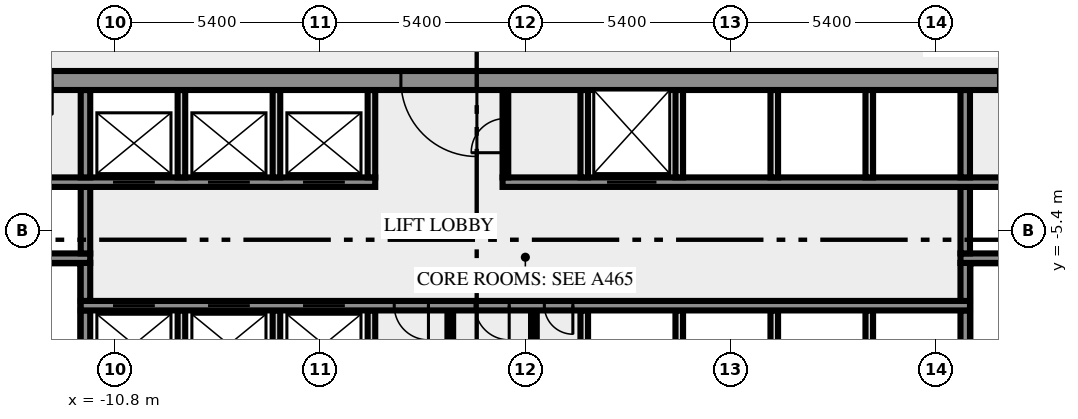
"""IFC4 building model, lengths in metres.
Left out: names, types, materials, properties, quantities, classifications, styles, units other than length and angle.
Written with IfcOpenShell. Run it as: python <this file> out.ifc"""

import sys

from ifc_helpers import new_model, si_unit, direction, frame, frame_2d, origin, place, context, subcontext, project, spatial, rectangle, extrude, element, fill, save


model = new_model("IFC4")
c1 = context("Model", 3, precision=1e-05, world=origin(), true_north=direction((0.0, 1.0)))
c2 = subcontext(c1, "Body", "Model", "MODEL_VIEW")
j1 = project(units=[si_unit("LENGTHUNIT", "METRE"), si_unit("PLANEANGLEUNIT", "RADIAN")], contexts=[c1])
p1 = place(None, origin())
s1 = spatial("IfcSite", under=j1, at=p1, CompositionType="ELEMENT")
p2 = place(p1, origin())
s2 = spatial("IfcBuilding", under=s1, at=p2, CompositionType="ELEMENT")
p3 = place(p2, frame((0.0, 0.0, 89.0)))
s3 = spatial("IfcBuildingStorey", under=s2, at=p3, CompositionType="ELEMENT", Elevation=89.0)
p4 = place(p3, frame((-11.575, -10.5, 0.0), z_axis=(0.0, 0.0, 1.0), x_axis=(0.0, 1.0, 0.0)))
e1 = element("IfcWall", 1, at=p4, inside=s3, PredefinedType="SHEAR", context=c2, shape_type="SweptSolid", body=[
    extrude(rectangle(XDim=3.0, YDim=0.25, at=frame_2d((1.5, 0.0))), origin(), (0.0, 0.0, 1.0), 3.65),
])
for number, where, z_axis, x_axis in (
    (2, (-9.05, -10.5, 0.0), (0.0, 0.0, 1.0), (0.0, 1.0, 0.0)),
    (3, (-6.55, -10.5, 0.0), (0.0, 0.0, 1.0), (0.0, 1.0, 0.0)),
    (4, (-4.05, -10.5, 0.0), (0.0, 0.0, 1.0), (0.0, 1.0, 0.0)),
):
    element("IfcWall", number, at=place(p3, frame(where, z_axis=z_axis, x_axis=x_axis)), inside=s3, PredefinedType="SOLIDWALL", context=c2, shape_type="SweptSolid", body=[
        extrude(rectangle(XDim=3.0, YDim=0.2, at=frame_2d((1.5, 0.0))), origin(), (0.0, 0.0, 1.0), 3.65),
    ])
for number, where, z_axis, x_axis in (
    (5, (-1.975, -10.5, 0.0), (0.0, 0.0, 1.0), (0.0, 1.0, 0.0)),
    (6, (0.225, -10.5, 0.0), (0.0, 0.0, 1.0), (0.0, 1.0, 0.0)),
):
    element("IfcWall", number, at=place(p3, frame(where, z_axis=z_axis, x_axis=x_axis)), inside=s3, PredefinedType="PARTITIONING", context=c2, shape_type="SweptSolid", body=[
        extrude(rectangle(XDim=3.0, YDim=0.15, at=frame_2d((1.5, 0.0))), origin(), (0.0, 0.0, 1.0), 3.65),
    ])
for number, where, z_axis, x_axis in (
    (7, (1.55, -10.5, 0.0), (0.0, 0.0, 1.0), (0.0, 1.0, 0.0)),
    (8, (4.05, -10.5, 0.0), (0.0, 0.0, 1.0), (0.0, 1.0, 0.0)),
    (9, (6.55, -10.5, 0.0), (0.0, 0.0, 1.0), (0.0, 1.0, 0.0)),
    (10, (9.05, -10.5, 0.0), (0.0, 0.0, 1.0), (0.0, 1.0, 0.0)),
):
    element("IfcWall", number, at=place(p3, frame(where, z_axis=z_axis, x_axis=x_axis)), inside=s3, PredefinedType="SOLIDWALL", context=c2, shape_type="SweptSolid", body=[
        extrude(rectangle(XDim=3.0, YDim=0.2, at=frame_2d((1.5, 0.0))), origin(), (0.0, 0.0, 1.0), 3.65),
    ])
p5 = place(p3, frame((11.575, -10.5, 0.0), z_axis=(0.0, 0.0, 1.0), x_axis=(0.0, 1.0, 0.0)))
e11 = element("IfcWall", 11, at=p5, inside=s3, PredefinedType="SHEAR", context=c2, shape_type="SweptSolid", body=[
    extrude(rectangle(XDim=3.0, YDim=0.25, at=frame_2d((1.5, 0.0))), origin(), (0.0, 0.0, 1.0), 3.65),
])
p6 = place(p3, frame((11.7, -7.375, 0.0), z_axis=(0.0, 0.0, 1.0), x_axis=(-1.0, 0.0, 0.0)))
e12 = element("IfcWall", 12, at=p6, inside=s3, PredefinedType="SHEAR", context=c2, shape_type="SweptSolid", body=[
    extrude(rectangle(XDim=23.4, YDim=0.25, at=frame_2d((11.7, 0.0))), origin(), (0.0, 0.0, 1.0), 3.65),
])
p7 = place(p6, frame((21.45, 0.0, 0.0)))
e13 = element("IfcOpeningElement", 13, at=p7, cuts=e12, PredefinedType="OPENING", context=c2, shape_type="SweptSolid", body=[
    extrude(rectangle(XDim=1.1, YDim=2.1, at=frame_2d((0.55, 1.05))), frame((0.0, 0.135, 0.0), z_axis=(0.0, -1.0, 0.0), x_axis=(1.0, 0.0, 0.0)), (0.0, 0.0, 1.0), 0.27),
])
p8 = place(p6, frame((18.95, 0.0, 0.0)))
e14 = element("IfcOpeningElement", 14, at=p8, cuts=e12, PredefinedType="OPENING", context=c2, shape_type="SweptSolid", body=[
    extrude(rectangle(XDim=1.1, YDim=2.1, at=frame_2d((0.55, 1.05))), frame((0.0, 0.135, 0.0), z_axis=(0.0, -1.0, 0.0), x_axis=(1.0, 0.0, 0.0)), (0.0, 0.0, 1.0), 0.27),
])
p9 = place(p6, frame((16.45, 0.0, 0.0)))
e15 = element("IfcOpeningElement", 15, at=p9, cuts=e12, PredefinedType="OPENING", context=c2, shape_type="SweptSolid", body=[
    extrude(rectangle(XDim=1.1, YDim=2.1, at=frame_2d((0.55, 1.05))), frame((0.0, 0.135, 0.0), z_axis=(0.0, -1.0, 0.0), x_axis=(1.0, 0.0, 0.0)), (0.0, 0.0, 1.0), 0.27),
])
p10 = place(p6, frame((14.25, 0.0, 0.0)))
e16 = element("IfcOpeningElement", 16, at=p10, cuts=e12, PredefinedType="OPENING", context=c2, shape_type="SweptSolid", body=[
    extrude(rectangle(XDim=0.9, YDim=2.1, at=frame_2d((0.45, 1.05))), frame((0.0, 0.135, 0.0), z_axis=(0.0, -1.0, 0.0), x_axis=(1.0, 0.0, 0.0)), (0.0, 0.0, 1.0), 0.27),
])
p11 = place(p6, frame((12.125, 0.0, 0.0)))
e17 = element("IfcOpeningElement", 17, at=p11, cuts=e12, PredefinedType="OPENING", context=c2, shape_type="SweptSolid", body=[
    extrude(rectangle(XDim=0.9, YDim=2.1, at=frame_2d((0.45, 1.05))), frame((0.0, 0.135, 0.0), z_axis=(0.0, -1.0, 0.0), x_axis=(1.0, 0.0, 0.0)), (0.0, 0.0, 1.0), 0.27),
])
p12 = place(p6, frame((10.45, 0.0, 0.0)))
e18 = element("IfcOpeningElement", 18, at=p12, cuts=e12, PredefinedType="OPENING", context=c2, shape_type="SweptSolid", body=[
    extrude(rectangle(XDim=0.75, YDim=2.1, at=frame_2d((0.375, 1.05))), frame((0.0, 0.135, 0.0), z_axis=(0.0, -1.0, 0.0), x_axis=(1.0, 0.0, 0.0)), (0.0, 0.0, 1.0), 0.27),
])
for number, where, z_axis, x_axis in (
    (19, (-11.575, -7.25, 0.0), (0.0, 0.0, 1.0), (0.0, 1.0, 0.0)),
    (20, (11.575, -7.25, 0.0), (0.0, 0.0, 1.0), (0.0, 1.0, 0.0)),
):
    element("IfcWall", number, at=place(p3, frame(where, z_axis=z_axis, x_axis=x_axis)), inside=s3, PredefinedType="SHEAR", context=c2, shape_type="SweptSolid", body=[
        extrude(rectangle(XDim=1.0, YDim=0.25, at=frame_2d((0.5, 0.0))), origin(), (0.0, 0.0, 1.0), 3.65),
    ])
p13 = place(p3, frame((-11.45, -6.125, 0.0), z_axis=(0.0, 0.0, 1.0), x_axis=(-1.0, 0.0, 0.0)))
e21 = element("IfcWall", 21, at=p13, inside=s3, PredefinedType="SHEAR", context=c2, shape_type="SweptSolid", body=[
    extrude(rectangle(XDim=8.05, YDim=0.25, at=frame_2d((4.025, 0.0))), origin(), (0.0, 0.0, 1.0), 3.65),
])
p14 = place(p13, frame((6.2, 0.0, 0.0)))
e22 = element("IfcOpeningElement", 22, at=p14, cuts=e21, PredefinedType="OPENING", context=c2, shape_type="SweptSolid", body=[
    extrude(rectangle(XDim=1.8, YDim=2.1, at=frame_2d((0.9, 1.05))), frame((0.0, 0.135, 0.0), z_axis=(0.0, -1.0, 0.0), x_axis=(1.0, 0.0, 0.0)), (0.0, 0.0, 1.0), 0.27),
])
p15 = place(p3, frame((19.5, -6.125, 0.0), z_axis=(0.0, 0.0, 1.0), x_axis=(-1.0, 0.0, 0.0)))
e23 = element("IfcWall", 23, at=p15, inside=s3, PredefinedType="SHEAR", context=c2, shape_type="SweptSolid", body=[
    extrude(rectangle(XDim=8.05, YDim=0.25, at=frame_2d((4.025, 0.0))), origin(), (0.0, 0.0, 1.0), 3.65),
])
p16 = place(p15, frame((0.05, 0.0, 0.0)))
e24 = element("IfcOpeningElement", 24, at=p16, cuts=e23, PredefinedType="OPENING", context=c2, shape_type="SweptSolid", body=[
    extrude(rectangle(XDim=1.8, YDim=2.1, at=frame_2d((0.9, 1.05))), frame((0.0, 0.135, 0.0), z_axis=(0.0, -1.0, 0.0), x_axis=(1.0, 0.0, 0.0)), (0.0, 0.0, 1.0), 0.27),
])
for number, where, z_axis, x_axis in (
    (25, (-11.575, -6.0, 0.0), (0.0, 0.0, 1.0), (0.0, 1.0, 0.0)),
    (26, (11.575, -6.0, 0.0), (0.0, 0.0, 1.0), (0.0, 1.0, 0.0)),
):
    element("IfcWall", number, at=place(p3, frame(where, z_axis=z_axis, x_axis=x_axis)), inside=s3, PredefinedType="SHEAR", context=c2, shape_type="SweptSolid", body=[
        extrude(rectangle(XDim=1.75, YDim=0.25, at=frame_2d((0.875, 0.0))), origin(), (0.0, 0.0, 1.0), 3.65),
    ])
p17 = place(p3, frame((-14.35, -4.125, 0.0), z_axis=(0.0, 0.0, 1.0), x_axis=(1.0, 0.0, 0.0)))
e27 = element("IfcWall", 27, at=p17, inside=s3, PredefinedType="SHEAR", context=c2, shape_type="SweptSolid", body=[
    extrude(rectangle(XDim=10.4, YDim=0.25, at=frame_2d((5.2, 0.0))), origin(), (0.0, 0.0, 1.0), 3.65),
])
p18 = place(p17, frame((3.5, 0.0, 0.0)))
e28 = element("IfcOpeningElement", 28, at=p18, cuts=e27, PredefinedType="OPENING", context=c2, shape_type="SweptSolid", body=[
    extrude(rectangle(XDim=1.1, YDim=2.1, at=frame_2d((0.55, 1.05))), frame((0.0, 0.135, 0.0), z_axis=(0.0, -1.0, 0.0), x_axis=(1.0, 0.0, 0.0)), (0.0, 0.0, 1.0), 0.27),
])
p19 = place(p17, frame((6.0, 0.0, 0.0)))
e29 = element("IfcOpeningElement", 29, at=p19, cuts=e27, PredefinedType="OPENING", context=c2, shape_type="SweptSolid", body=[
    extrude(rectangle(XDim=1.1, YDim=2.1, at=frame_2d((0.55, 1.05))), frame((0.0, 0.135, 0.0), z_axis=(0.0, -1.0, 0.0), x_axis=(1.0, 0.0, 0.0)), (0.0, 0.0, 1.0), 0.27),
])
p20 = place(p17, frame((8.5, 0.0, 0.0)))
e30 = element("IfcOpeningElement", 30, at=p20, cuts=e27, PredefinedType="OPENING", context=c2, shape_type="SweptSolid", body=[
    extrude(rectangle(XDim=1.1, YDim=2.1, at=frame_2d((0.55, 1.05))), frame((0.0, 0.135, 0.0), z_axis=(0.0, -1.0, 0.0), x_axis=(1.0, 0.0, 0.0)), (0.0, 0.0, 1.0), 0.27),
])
p21 = place(p3, frame((-0.6, -4.125, 0.0), z_axis=(0.0, 0.0, 1.0), x_axis=(1.0, 0.0, 0.0)))
e31 = element("IfcWall", 31, at=p21, inside=s3, PredefinedType="SHEAR", context=c2, shape_type="SweptSolid", body=[
    extrude(rectangle(XDim=14.95, YDim=0.25, at=frame_2d((7.475, 0.0))), origin(), (0.0, 0.0, 1.0), 3.65),
])
p22 = place(p21, frame((2.75, 0.0, 0.0)))
e32 = element("IfcOpeningElement", 32, at=p22, cuts=e31, PredefinedType="OPENING", context=c2, shape_type="SweptSolid", body=[
    extrude(rectangle(XDim=1.3, YDim=2.1, at=frame_2d((0.65, 1.05))), frame((0.0, 0.135, 0.0), z_axis=(0.0, -1.0, 0.0), x_axis=(1.0, 0.0, 0.0)), (0.0, 0.0, 1.0), 0.27),
])
p23 = place(p3, frame((-11.575, -4.0, 0.0), z_axis=(0.0, 0.0, 1.0), x_axis=(0.0, 1.0, 0.0)))
e33 = element("IfcWall", 33, at=p23, inside=s3, PredefinedType="SHEAR", context=c2, shape_type="SweptSolid", body=[
    extrude(rectangle(XDim=2.3, YDim=0.25, at=frame_2d((1.15, 0.0))), origin(), (0.0, 0.0, 1.0), 3.65),
])
for number, where, z_axis, x_axis in (
    (34, (-9.05, -4.0, 0.0), (0.0, 0.0, 1.0), (0.0, 1.0, 0.0)),
    (35, (-6.55, -4.0, 0.0), (0.0, 0.0, 1.0), (0.0, 1.0, 0.0)),
    (36, (-4.05, -4.0, 0.0), (0.0, 0.0, 1.0), (0.0, 1.0, 0.0)),
):
    element("IfcWall", number, at=place(p3, frame(where, z_axis=z_axis, x_axis=x_axis)), inside=s3, PredefinedType="SOLIDWALL", context=c2, shape_type="SweptSolid", body=[
        extrude(rectangle(XDim=2.3, YDim=0.2, at=frame_2d((1.15, 0.0))), origin(), (0.0, 0.0, 1.0), 3.65),
    ])
p24 = place(p3, frame((-0.525, -4.0, 0.0), z_axis=(0.0, 0.0, 1.0), x_axis=(0.0, 1.0, 0.0)))
e37 = element("IfcWall", 37, at=p24, inside=s3, PredefinedType="PARTITIONING", context=c2, shape_type="SweptSolid", body=[
    extrude(rectangle(XDim=2.3, YDim=0.15, at=frame_2d((1.15, 0.0))), origin(), (0.0, 0.0, 1.0), 3.65),
])
p25 = place(p24, frame((0.65, 0.0, 0.0)))
e38 = element("IfcOpeningElement", 38, at=p25, cuts=e37, PredefinedType="OPENING", context=c2, shape_type="SweptSolid", body=[
    extrude(rectangle(XDim=0.9, YDim=2.1, at=frame_2d((0.45, 1.05))), frame((0.0, 0.085, 0.0), z_axis=(0.0, -1.0, 0.0), x_axis=(1.0, 0.0, 0.0)), (0.0, 0.0, 1.0), 0.17),
])
for number, where, z_axis, x_axis in (
    (39, (1.55, -4.0, 0.0), (0.0, 0.0, 1.0), (0.0, 1.0, 0.0)),
    (40, (4.05, -4.0, 0.0), (0.0, 0.0, 1.0), (0.0, 1.0, 0.0)),
    (41, (6.55, -4.0, 0.0), (0.0, 0.0, 1.0), (0.0, 1.0, 0.0)),
    (42, (9.05, -4.0, 0.0), (0.0, 0.0, 1.0), (0.0, 1.0, 0.0)),
):
    element("IfcWall", number, at=place(p3, frame(where, z_axis=z_axis, x_axis=x_axis)), inside=s3, PredefinedType="SOLIDWALL", context=c2, shape_type="SweptSolid", body=[
        extrude(rectangle(XDim=2.3, YDim=0.2, at=frame_2d((1.15, 0.0))), origin(), (0.0, 0.0, 1.0), 3.65),
    ])
p26 = place(p3, frame((11.575, -4.0, 0.0), z_axis=(0.0, 0.0, 1.0), x_axis=(0.0, 1.0, 0.0)))
e43 = element("IfcWall", 43, at=p26, inside=s3, PredefinedType="SHEAR", context=c2, shape_type="SweptSolid", body=[
    extrude(rectangle(XDim=2.3, YDim=0.25, at=frame_2d((1.15, 0.0))), origin(), (0.0, 0.0, 1.0), 3.65),
])
p27 = place(p3, frame((20.49, -1.45, 0.0), z_axis=(0.0, 0.0, 1.0), x_axis=(-1.0, 0.0, 0.0)))
e44 = element("IfcWall", 44, at=p27, inside=s3, PredefinedType="SHEAR", context=c2, shape_type="SweptSolid", body=[
    extrude(rectangle(XDim=40.98, YDim=0.5, at=frame_2d((20.49, 0.0))), origin(), (0.0, 0.0, 1.0), 3.65),
])
p28 = place(p27, frame((38.14, 0.0, 0.0)))
e45 = element("IfcOpeningElement", 45, at=p28, cuts=e44, PredefinedType="OPENING", context=c2, shape_type="SweptSolid", body=[
    extrude(rectangle(XDim=1.8, YDim=2.1, at=frame_2d((0.9, 1.05))), frame((0.0, 0.26, 0.0), z_axis=(0.0, -1.0, 0.0), x_axis=(1.0, 0.0, 0.0)), (0.0, 0.0, 1.0), 0.52),
])
p29 = place(p27, frame((35.89, 0.0, 0.0)))
e46 = element("IfcOpeningElement", 46, at=p29, cuts=e44, PredefinedType="OPENING", context=c2, shape_type="SweptSolid", body=[
    extrude(rectangle(XDim=0.9, YDim=2.1, at=frame_2d((0.45, 1.05))), frame((0.0, 0.26, 0.0), z_axis=(0.0, -1.0, 0.0), x_axis=(1.0, 0.0, 0.0)), (0.0, 0.0, 1.0), 0.52),
])
p30 = place(p27, frame((32.94, 0.0, 0.0)))
e47 = element("IfcOpeningElement", 47, at=p30, cuts=e44, PredefinedType="OPENING", context=c2, shape_type="SweptSolid", body=[
    extrude(rectangle(XDim=0.9, YDim=2.1, at=frame_2d((0.45, 1.05))), frame((0.0, 0.26, 0.0), z_axis=(0.0, -1.0, 0.0), x_axis=(1.0, 0.0, 0.0)), (0.0, 0.0, 1.0), 0.52),
])
p31 = place(p27, frame((21.765, 0.0, 0.0)))
e48 = element("IfcOpeningElement", 48, at=p31, cuts=e44, PredefinedType="OPENING", context=c2, shape_type="SweptSolid", body=[
    extrude(rectangle(XDim=2.0, YDim=2.1, at=frame_2d((1.0, 1.05))), frame((0.0, 0.26, 0.0), z_axis=(0.0, -1.0, 0.0), x_axis=(1.0, 0.0, 0.0)), (0.0, 0.0, 1.0), 0.52),
])
p32 = place(p27, frame((7.14, 0.0, 0.0)))
e49 = element("IfcOpeningElement", 49, at=p32, cuts=e44, PredefinedType="OPENING", context=c2, shape_type="SweptSolid", body=[
    extrude(rectangle(XDim=0.9, YDim=2.1, at=frame_2d((0.45, 1.05))), frame((0.0, 0.26, 0.0), z_axis=(0.0, -1.0, 0.0), x_axis=(1.0, 0.0, 0.0)), (0.0, 0.0, 1.0), 0.52),
])
p33 = place(p27, frame((5.028, 0.0, 0.0)))
e50 = element("IfcOpeningElement", 50, at=p33, cuts=e44, PredefinedType="OPENING", context=c2, shape_type="SweptSolid", body=[
    extrude(rectangle(XDim=0.8, YDim=2.1, at=frame_2d((0.4, 1.05))), frame((0.0, 0.26, 0.0), z_axis=(0.0, -1.0, 0.0), x_axis=(1.0, 0.0, 0.0)), (0.0, 0.0, 1.0), 0.52),
])
p34 = place(p27, frame((3.452, 0.0, 0.0)))
e51 = element("IfcOpeningElement", 51, at=p34, cuts=e44, PredefinedType="OPENING", context=c2, shape_type="SweptSolid", body=[
    extrude(rectangle(XDim=0.8, YDim=2.1, at=frame_2d((0.4, 1.05))), frame((0.0, 0.26, 0.0), z_axis=(0.0, -1.0, 0.0), x_axis=(1.0, 0.0, 0.0)), (0.0, 0.0, 1.0), 0.52),
])
p35 = place(p27, frame((1.04, 0.0, 0.0)))
e52 = element("IfcOpeningElement", 52, at=p35, cuts=e44, PredefinedType="OPENING", context=c2, shape_type="SweptSolid", body=[
    extrude(rectangle(XDim=1.8, YDim=2.1, at=frame_2d((0.9, 1.05))), frame((0.0, 0.26, 0.0), z_axis=(0.0, -1.0, 0.0), x_axis=(1.0, 0.0, 0.0)), (0.0, 0.0, 1.0), 0.52),
])
p36 = place(p7, origin())
e53 = element("IfcDoor", 53, at=p36, inside=s3, OperationType="DOUBLE_DOOR_SLIDING", PredefinedType="DOOR", context=c2, shape_type="SweptSolid", body=[
    extrude(rectangle(XDim=1.1, YDim=2.1, at=frame_2d((0.55, 1.05))), frame((0.0, 0.025, 0.0), z_axis=(0.0, -1.0, 0.0), x_axis=(1.0, 0.0, 0.0)), (0.0, 0.0, 1.0), 0.05),
])
fill(e13, e53)
p37 = place(p8, origin())
e54 = element("IfcDoor", 54, at=p37, inside=s3, OperationType="DOUBLE_DOOR_SLIDING", PredefinedType="DOOR", context=c2, shape_type="SweptSolid", body=[
    extrude(rectangle(XDim=1.1, YDim=2.1, at=frame_2d((0.55, 1.05))), frame((0.0, 0.025, 0.0), z_axis=(0.0, -1.0, 0.0), x_axis=(1.0, 0.0, 0.0)), (0.0, 0.0, 1.0), 0.05),
])
fill(e14, e54)
p38 = place(p9, origin())
e55 = element("IfcDoor", 55, at=p38, inside=s3, OperationType="DOUBLE_DOOR_SLIDING", PredefinedType="DOOR", context=c2, shape_type="SweptSolid", body=[
    extrude(rectangle(XDim=1.1, YDim=2.1, at=frame_2d((0.55, 1.05))), frame((0.0, 0.025, 0.0), z_axis=(0.0, -1.0, 0.0), x_axis=(1.0, 0.0, 0.0)), (0.0, 0.0, 1.0), 0.05),
])
fill(e15, e55)
p39 = place(p10, origin())
e56 = element("IfcDoor", 56, at=p39, inside=s3, OperationType="SINGLE_SWING_RIGHT", PredefinedType="DOOR", context=c2, shape_type="SweptSolid", body=[
    extrude(rectangle(XDim=0.9, YDim=2.1, at=frame_2d((0.45, 1.05))), frame((0.0, 0.025, 0.0), z_axis=(0.0, -1.0, 0.0), x_axis=(1.0, 0.0, 0.0)), (0.0, 0.0, 1.0), 0.05),
])
fill(e16, e56)
p40 = place(p11, origin())
e57 = element("IfcDoor", 57, at=p40, inside=s3, OperationType="SINGLE_SWING_RIGHT", PredefinedType="DOOR", context=c2, shape_type="SweptSolid", body=[
    extrude(rectangle(XDim=0.9, YDim=2.1, at=frame_2d((0.45, 1.05))), frame((0.0, 0.025, 0.0), z_axis=(0.0, -1.0, 0.0), x_axis=(1.0, 0.0, 0.0)), (0.0, 0.0, 1.0), 0.05),
])
fill(e17, e57)
p41 = place(p12, origin())
e58 = element("IfcDoor", 58, at=p41, inside=s3, OperationType="SINGLE_SWING_LEFT", PredefinedType="DOOR", context=c2, shape_type="SweptSolid", body=[
    extrude(rectangle(XDim=0.75, YDim=2.1, at=frame_2d((0.375, 1.05))), frame((0.0, 0.025, 0.0), z_axis=(0.0, -1.0, 0.0), x_axis=(1.0, 0.0, 0.0)), (0.0, 0.0, 1.0), 0.05),
])
fill(e18, e58)
p42 = place(p18, origin())
e59 = element("IfcDoor", 59, at=p42, inside=s3, OperationType="DOUBLE_DOOR_SLIDING", PredefinedType="DOOR", context=c2, shape_type="SweptSolid", body=[
    extrude(rectangle(XDim=1.1, YDim=2.1, at=frame_2d((0.55, 1.05))), frame((0.0, 0.025, 0.0), z_axis=(0.0, -1.0, 0.0), x_axis=(1.0, 0.0, 0.0)), (0.0, 0.0, 1.0), 0.05),
])
fill(e28, e59)
p43 = place(p19, origin())
e60 = element("IfcDoor", 60, at=p43, inside=s3, OperationType="DOUBLE_DOOR_SLIDING", PredefinedType="DOOR", context=c2, shape_type="SweptSolid", body=[
    extrude(rectangle(XDim=1.1, YDim=2.1, at=frame_2d((0.55, 1.05))), frame((0.0, 0.025, 0.0), z_axis=(0.0, -1.0, 0.0), x_axis=(1.0, 0.0, 0.0)), (0.0, 0.0, 1.0), 0.05),
])
fill(e29, e60)
p44 = place(p20, origin())
e61 = element("IfcDoor", 61, at=p44, inside=s3, OperationType="DOUBLE_DOOR_SLIDING", PredefinedType="DOOR", context=c2, shape_type="SweptSolid", body=[
    extrude(rectangle(XDim=1.1, YDim=2.1, at=frame_2d((0.55, 1.05))), frame((0.0, 0.025, 0.0), z_axis=(0.0, -1.0, 0.0), x_axis=(1.0, 0.0, 0.0)), (0.0, 0.0, 1.0), 0.05),
])
fill(e30, e61)
p45 = place(p22, origin())
e62 = element("IfcDoor", 62, at=p45, inside=s3, OperationType="DOUBLE_DOOR_SLIDING", PredefinedType="DOOR", context=c2, shape_type="SweptSolid", body=[
    extrude(rectangle(XDim=1.3, YDim=2.1, at=frame_2d((0.65, 1.05))), frame((0.0, 0.025, 0.0), z_axis=(0.0, -1.0, 0.0), x_axis=(1.0, 0.0, 0.0)), (0.0, 0.0, 1.0), 0.05),
])
fill(e32, e62)
p46 = place(p25, origin())
e63 = element("IfcDoor", 63, at=p46, inside=s3, OperationType="SINGLE_SWING_LEFT", PredefinedType="DOOR", context=c2, shape_type="SweptSolid", body=[
    extrude(rectangle(XDim=0.9, YDim=2.1, at=frame_2d((0.45, 1.05))), frame((0.0, 0.025, 0.0), z_axis=(0.0, -1.0, 0.0), x_axis=(1.0, 0.0, 0.0)), (0.0, 0.0, 1.0), 0.05),
])
fill(e38, e63)
p47 = place(p31, origin())
e64 = element("IfcDoor", 64, at=p47, inside=s3, OperationType="DOUBLE_DOOR_SINGLE_SWING", PredefinedType="DOOR", context=c2, shape_type="SweptSolid", body=[
    extrude(rectangle(XDim=2.0, YDim=2.1, at=frame_2d((1.0, 1.05))), frame((0.0, 0.025, 0.0), z_axis=(0.0, -1.0, 0.0), x_axis=(1.0, 0.0, 0.0)), (0.0, 0.0, 1.0), 0.05),
])
fill(e48, e64)
save(model, sys.argv[1])
